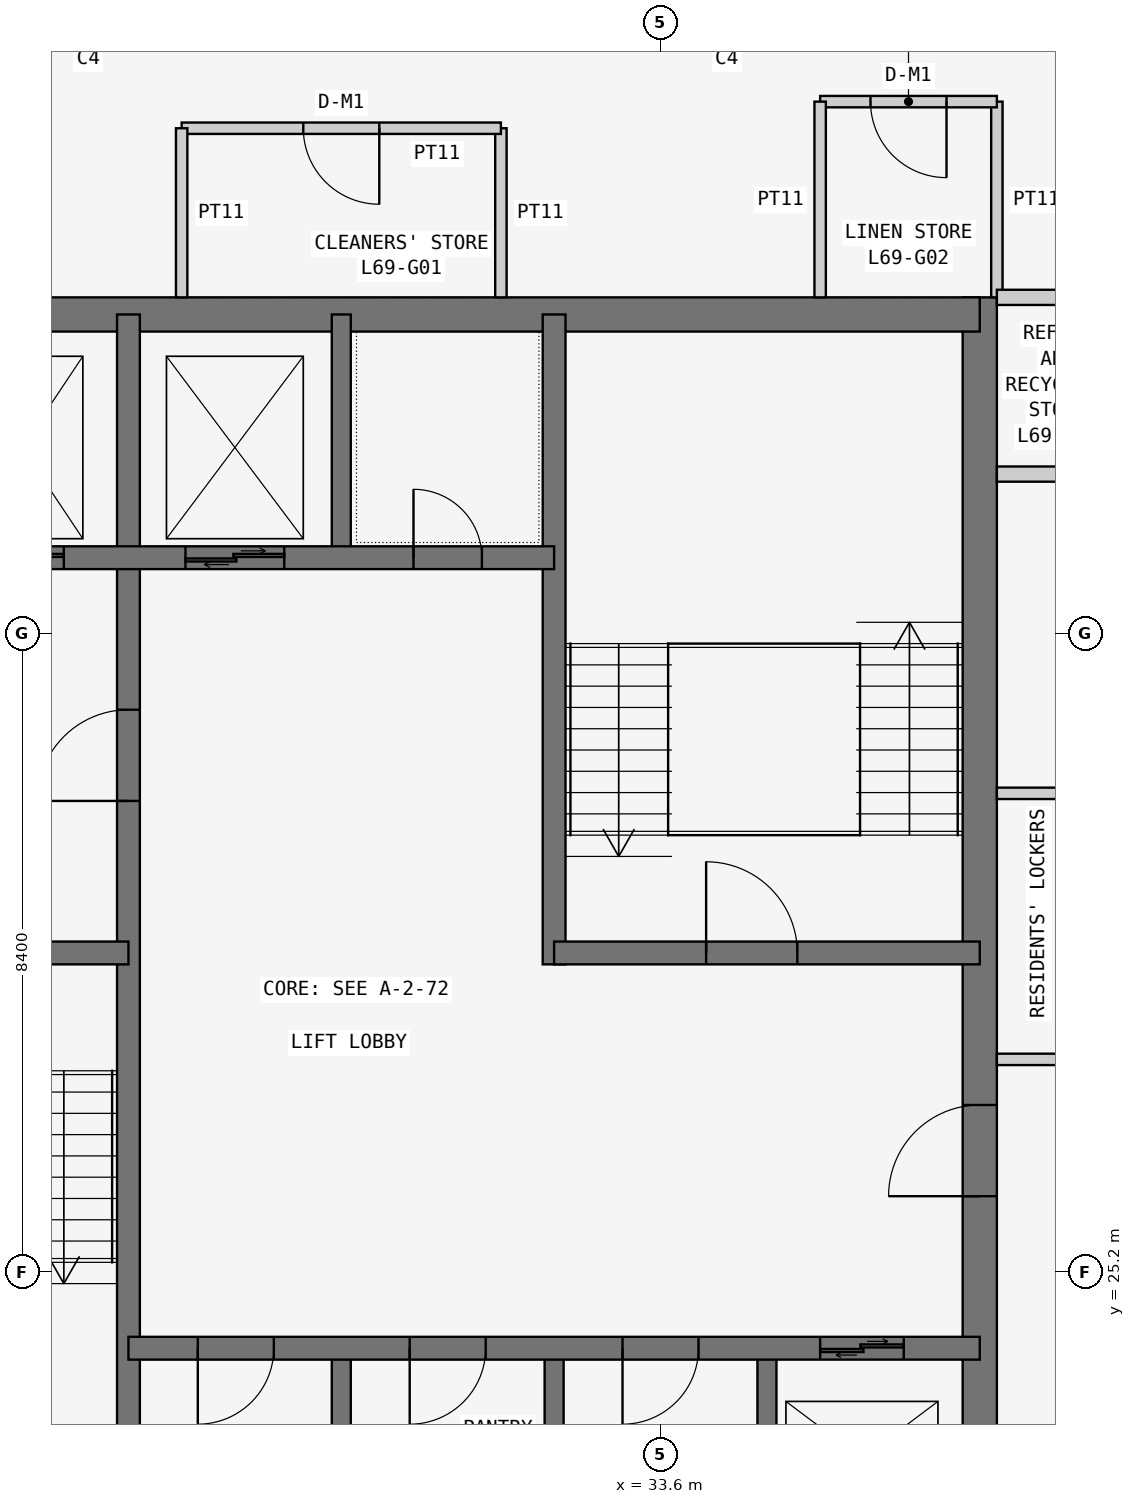
"""IFC4 building model, lengths in metres.
Left out: names, types, materials, properties, quantities, classifications, styles, units other than length and angle.
Written with IfcOpenShell. Run it as: python <this file> out.ifc"""

import sys

from ifc_helpers import new_model, si_unit, direction, frame, frame_2d, origin, place, context, subcontext, project, spatial, rectangle, extrude, element, fill, save


model = new_model("IFC4")
c1 = context("Model", 3, precision=1e-05, world=origin(), true_north=direction((0.0, 1.0)))
c2 = subcontext(c1, "Body", "Model", "MODEL_VIEW")
j1 = project(units=[si_unit("LENGTHUNIT", "METRE"), si_unit("PLANEANGLEUNIT", "RADIAN")], contexts=[c1])
p1 = place(None, origin())
s1 = spatial("IfcSite", under=j1, at=p1, CompositionType="ELEMENT")
p2 = place(p1, origin())
s2 = spatial("IfcBuilding", under=s1, at=p2, CompositionType="ELEMENT")
p3 = place(p2, frame((0.0, 0.0, 264.9)))
s3 = spatial("IfcBuildingStorey", under=s2, at=p3, CompositionType="ELEMENT", Elevation=264.9)
p4 = place(p3, frame((37.8, 21.0, 0.0), z_axis=(0.0, 0.0, 1.0), x_axis=(0.0, 1.0, 0.0)))
e1 = element("IfcWall", 1, at=p4, inside=s3, PredefinedType="SHEAR", context=c2, shape_type="SweptSolid", body=[
    extrude(rectangle(XDim=17.025, YDim=0.45, at=frame_2d((8.512, 0.0))), origin(), (0.0, 0.0, 1.0), 3.6),
])
p5 = place(p4, frame((5.2, 0.0, 0.0)))
e2 = element("IfcOpeningElement", 2, at=p5, cuts=e1, PredefinedType="OPENING", context=c2, shape_type="SweptSolid", body=[
    extrude(rectangle(XDim=1.2, YDim=2.1, at=frame_2d((0.6, 1.05))), frame((0.0, 0.235, 0.0), z_axis=(0.0, -1.0, 0.0), x_axis=(1.0, 0.0, 0.0)), (0.0, 0.0, 1.0), 0.47),
])
p6 = place(p3, frame((37.8, 37.8, 0.0), z_axis=(0.0, 0.0, 1.0), x_axis=(-1.0, 0.0, 0.0)))
e3 = element("IfcWall", 3, at=p6, inside=s3, PredefinedType="SHEAR", context=c2, shape_type="SweptSolid", body=[
    extrude(rectangle(XDim=17.025, YDim=0.45, at=frame_2d((8.513, 0.0))), origin(), (0.0, 0.0, 1.0), 3.6),
])
p7 = place(p3, frame((26.6, 21.0, 0.0), z_axis=(0.0, 0.0, 1.0), x_axis=(0.0, 1.0, 0.0)))
e4 = element("IfcWall", 4, at=p7, inside=s3, PredefinedType="SHEAR", context=c2, shape_type="SweptSolid", body=[
    extrude(rectangle(XDim=16.8, YDim=0.3, at=frame_2d((8.4, 0.0))), origin(), (0.0, 0.0, 1.0), 3.6),
])
p8 = place(p7, frame((10.4, 0.0, 0.0)))
e5 = element("IfcOpeningElement", 5, at=p8, cuts=e4, PredefinedType="OPENING", context=c2, shape_type="SweptSolid", body=[
    extrude(rectangle(XDim=1.2, YDim=2.1, at=frame_2d((0.6, 1.05))), frame((0.0, 0.16, 0.0), z_axis=(0.0, -1.0, 0.0), x_axis=(1.0, 0.0, 0.0)), (0.0, 0.0, 1.0), 0.32),
])
p9 = place(p3, frame((21.0, 29.4, 0.0), z_axis=(0.0, 0.0, 1.0), x_axis=(1.0, 0.0, 0.0)))
e6 = element("IfcWall", 6, at=p9, inside=s3, PredefinedType="SHEAR", context=c2, shape_type="SweptSolid", body=[
    extrude(rectangle(XDim=5.6, YDim=0.3, at=frame_2d((2.8, 0.0))), origin(), (0.0, 0.0, 1.0), 3.6),
])
p10 = place(p9, frame((2.3, 0.0, 0.0)))
e7 = element("IfcOpeningElement", 7, at=p10, cuts=e6, PredefinedType="OPENING", context=c2, shape_type="SweptSolid", body=[
    extrude(rectangle(XDim=1.2, YDim=2.1, at=frame_2d((0.6, 1.05))), frame((0.0, 0.16, 0.0), z_axis=(0.0, -1.0, 0.0), x_axis=(1.0, 0.0, 0.0)), (0.0, 0.0, 1.0), 0.32),
])
p11 = place(p3, frame((21.0, 34.6, 0.0), z_axis=(0.0, 0.0, 1.0), x_axis=(1.0, 0.0, 0.0)))
e8 = element("IfcWall", 8, at=p11, inside=s3, PredefinedType="SHEAR", context=c2, shape_type="SweptSolid", body=[
    extrude(rectangle(XDim=11.2, YDim=0.3, at=frame_2d((5.6, 0.0))), origin(), (0.0, 0.0, 1.0), 3.6),
])
p12 = place(p11, frame((9.35, 0.0, 0.0)))
e9 = element("IfcOpeningElement", 9, at=p12, cuts=e8, PredefinedType="OPENING", context=c2, shape_type="SweptSolid", body=[
    extrude(rectangle(XDim=0.9, YDim=2.1, at=frame_2d((0.45, 1.05))), frame((0.0, 0.16, 0.0), z_axis=(0.0, -1.0, 0.0), x_axis=(1.0, 0.0, 0.0)), (0.0, 0.0, 1.0), 0.32),
])
p13 = place(p11, frame((1.0, 0.0, 0.0)))
e10 = element("IfcOpeningElement", 10, at=p13, cuts=e8, PredefinedType="OPENING", context=c2, shape_type="SweptSolid", body=[
    extrude(rectangle(XDim=1.1, YDim=2.1, at=frame_2d((0.55, 1.05))), frame((0.0, 0.16, 0.0), z_axis=(0.0, -1.0, 0.0), x_axis=(1.0, 0.0, 0.0)), (0.0, 0.0, 1.0), 0.32),
])
p14 = place(p11, frame((3.65, 0.0, 0.0)))
e11 = element("IfcOpeningElement", 11, at=p14, cuts=e8, PredefinedType="OPENING", context=c2, shape_type="SweptSolid", body=[
    extrude(rectangle(XDim=1.1, YDim=2.1, at=frame_2d((0.55, 1.05))), frame((0.0, 0.16, 0.0), z_axis=(0.0, -1.0, 0.0), x_axis=(1.0, 0.0, 0.0)), (0.0, 0.0, 1.0), 0.32),
])
p15 = place(p11, frame((6.35, 0.0, 0.0)))
e12 = element("IfcOpeningElement", 12, at=p15, cuts=e8, PredefinedType="OPENING", context=c2, shape_type="SweptSolid", body=[
    extrude(rectangle(XDim=1.3, YDim=2.1, at=frame_2d((0.65, 1.05))), frame((0.0, 0.16, 0.0), z_axis=(0.0, -1.0, 0.0), x_axis=(1.0, 0.0, 0.0)), (0.0, 0.0, 1.0), 0.32),
])
p16 = place(p3, frame((26.6, 24.2, 0.0), z_axis=(0.0, 0.0, 1.0), x_axis=(1.0, 0.0, 0.0)))
e13 = element("IfcWall", 13, at=p16, inside=s3, PredefinedType="SHEAR", context=c2, shape_type="SweptSolid", body=[
    extrude(rectangle(XDim=11.2, YDim=0.3, at=frame_2d((5.6, 0.0))), origin(), (0.0, 0.0, 1.0), 3.6),
])
p17 = place(p16, frame((0.913, 0.0, 0.0)))
e14 = element("IfcOpeningElement", 14, at=p17, cuts=e13, PredefinedType="OPENING", context=c2, shape_type="SweptSolid", body=[
    extrude(rectangle(XDim=1.0, YDim=2.1, at=frame_2d((0.5, 1.05))), frame((0.0, 0.16, 0.0), z_axis=(0.0, -1.0, 0.0), x_axis=(1.0, 0.0, 0.0)), (0.0, 0.0, 1.0), 0.32),
])
p18 = place(p16, frame((3.7, 0.0, 0.0)))
e15 = element("IfcOpeningElement", 15, at=p18, cuts=e13, PredefinedType="OPENING", context=c2, shape_type="SweptSolid", body=[
    extrude(rectangle(XDim=1.0, YDim=2.1, at=frame_2d((0.5, 1.05))), frame((0.0, 0.16, 0.0), z_axis=(0.0, -1.0, 0.0), x_axis=(1.0, 0.0, 0.0)), (0.0, 0.0, 1.0), 0.32),
])
p19 = place(p16, frame((6.5, 0.0, 0.0)))
e16 = element("IfcOpeningElement", 16, at=p19, cuts=e13, PredefinedType="OPENING", context=c2, shape_type="SweptSolid", body=[
    extrude(rectangle(XDim=1.0, YDim=2.1, at=frame_2d((0.5, 1.05))), frame((0.0, 0.16, 0.0), z_axis=(0.0, -1.0, 0.0), x_axis=(1.0, 0.0, 0.0)), (0.0, 0.0, 1.0), 0.32),
])
p20 = place(p16, frame((9.1, 0.0, 0.0)))
e17 = element("IfcOpeningElement", 17, at=p20, cuts=e13, PredefinedType="OPENING", context=c2, shape_type="SweptSolid", body=[
    extrude(rectangle(XDim=1.1, YDim=2.1, at=frame_2d((0.55, 1.05))), frame((0.0, 0.16, 0.0), z_axis=(0.0, -1.0, 0.0), x_axis=(1.0, 0.0, 0.0)), (0.0, 0.0, 1.0), 0.32),
])
p21 = place(p3, frame((32.2, 29.25, 0.0), z_axis=(0.0, 0.0, 1.0), x_axis=(0.0, 1.0, 0.0)))
e18 = element("IfcWall", 18, at=p21, inside=s3, PredefinedType="SHEAR", context=c2, shape_type="SweptSolid", body=[
    extrude(rectangle(XDim=8.55, YDim=0.3, at=frame_2d((4.275, 0.0))), origin(), (0.0, 0.0, 1.0), 3.6),
])
p22 = place(p3, frame((32.2, 29.4, 0.0), z_axis=(0.0, 0.0, 1.0), x_axis=(1.0, 0.0, 0.0)))
e19 = element("IfcWall", 19, at=p22, inside=s3, PredefinedType="SHEAR", context=c2, shape_type="SweptSolid", body=[
    extrude(rectangle(XDim=5.6, YDim=0.3, at=frame_2d((2.8, 0.0))), origin(), (0.0, 0.0, 1.0), 3.6),
])
p23 = place(p22, frame((2.0, 0.0, 0.0)))
e20 = element("IfcOpeningElement", 20, at=p23, cuts=e19, PredefinedType="OPENING", context=c2, shape_type="SweptSolid", body=[
    extrude(rectangle(XDim=1.2, YDim=2.1, at=frame_2d((0.6, 1.05))), frame((0.0, 0.16, 0.0), z_axis=(0.0, -1.0, 0.0), x_axis=(1.0, 0.0, 0.0)), (0.0, 0.0, 1.0), 0.32),
])
for number, where, z_axis, x_axis in (
    (21, (29.4, 21.0, 0.0), (0.0, 0.0, 1.0), (0.0, 1.0, 0.0)),
    (22, (32.2, 21.0, 0.0), (0.0, 0.0, 1.0), (0.0, 1.0, 0.0)),
    (23, (35.0, 21.0, 0.0), (0.0, 0.0, 1.0), (0.0, 1.0, 0.0)),
    (24, (29.4, 34.6, 0.0), (0.0, 0.0, 1.0), (0.0, 1.0, 0.0)),
):
    element("IfcWall", number, at=place(p3, frame(where, z_axis=z_axis, x_axis=x_axis)), inside=s3, PredefinedType="SHEAR", context=c2, shape_type="SweptSolid", body=[
        extrude(rectangle(XDim=3.2, YDim=0.25, at=frame_2d((1.6, 0.0))), origin(), (0.0, 0.0, 1.0), 3.6),
    ])
p24 = place(p3, frame((31.5, 38.025, 0.0), z_axis=(0.0, 0.0, 1.0), x_axis=(0.0, 1.0, 0.0)))
e25 = element("IfcWall", 25, at=p24, inside=s3, PredefinedType="PARTITIONING", context=c2, shape_type="SweptSolid", body=[
    extrude(rectangle(XDim=2.225, YDim=0.15, at=frame_2d((1.113, 0.0))), origin(), (0.0, 0.0, 1.0), 3.45),
])
p25 = place(p3, frame((31.5, 40.25, 0.0), z_axis=(0.0, 0.0, 1.0), x_axis=(-1.0, 0.0, 0.0)))
e26 = element("IfcWall", 26, at=p25, inside=s3, PredefinedType="PARTITIONING", context=c2, shape_type="SweptSolid", body=[
    extrude(rectangle(XDim=4.2, YDim=0.15, at=frame_2d((2.1, 0.0))), origin(), (0.0, 0.0, 1.0), 3.45),
])
p26 = place(p25, frame((1.6, 0.0, 0.0)))
e27 = element("IfcOpeningElement", 27, at=p26, cuts=e26, PredefinedType="OPENING", context=c2, shape_type="SweptSolid", body=[
    extrude(rectangle(XDim=1.0, YDim=2.1, at=frame_2d((0.5, 1.05))), frame((0.0, 0.085, 0.0), z_axis=(0.0, -1.0, 0.0), x_axis=(1.0, 0.0, 0.0)), (0.0, 0.0, 1.0), 0.17),
])
p27 = place(p3, frame((27.3, 40.25, 0.0), z_axis=(0.0, 0.0, 1.0), x_axis=(0.0, -1.0, 0.0)))
e28 = element("IfcWall", 28, at=p27, inside=s3, PredefinedType="PARTITIONING", context=c2, shape_type="SweptSolid", body=[
    extrude(rectangle(XDim=2.225, YDim=0.15, at=frame_2d((1.113, 0.0))), origin(), (0.0, 0.0, 1.0), 3.45),
])
p28 = place(p3, frame((38.025, 38.025, 0.0), z_axis=(0.0, 0.0, 1.0), x_axis=(0.0, 1.0, 0.0)))
e29 = element("IfcWall", 29, at=p28, inside=s3, PredefinedType="PARTITIONING", context=c2, shape_type="SweptSolid", body=[
    extrude(rectangle(XDim=2.575, YDim=0.15, at=frame_2d((1.288, 0.0))), origin(), (0.0, 0.0, 1.0), 3.45),
])
p29 = place(p3, frame((38.025, 40.6, 0.0), z_axis=(0.0, 0.0, 1.0), x_axis=(-1.0, 0.0, 0.0)))
e30 = element("IfcWall", 30, at=p29, inside=s3, PredefinedType="PARTITIONING", context=c2, shape_type="SweptSolid", body=[
    extrude(rectangle(XDim=2.325, YDim=0.15, at=frame_2d((1.163, 0.0))), origin(), (0.0, 0.0, 1.0), 3.45),
])
p30 = place(p29, frame((0.663, 0.0, 0.0)))
e31 = element("IfcOpeningElement", 31, at=p30, cuts=e30, PredefinedType="OPENING", context=c2, shape_type="SweptSolid", body=[
    extrude(rectangle(XDim=1.0, YDim=2.1, at=frame_2d((0.5, 1.05))), frame((0.0, 0.085, 0.0), z_axis=(0.0, -1.0, 0.0), x_axis=(1.0, 0.0, 0.0)), (0.0, 0.0, 1.0), 0.17),
])
for number, where, z_axis, x_axis in (
    (32, (35.7, 40.6, 0.0), (0.0, 0.0, 1.0), (0.0, -1.0, 0.0)),
    (33, (38.025, 28.0, 0.0), (0.0, 0.0, 1.0), (1.0, 0.0, 0.0)),
    (34, (40.6, 31.5, 0.0), (0.0, 0.0, 1.0), (-1.0, 0.0, 0.0)),
):
    element("IfcWall", number, at=place(p3, frame(where, z_axis=z_axis, x_axis=x_axis)), inside=s3, PredefinedType="PARTITIONING", context=c2, shape_type="SweptSolid", body=[
        extrude(rectangle(XDim=2.575, YDim=0.15, at=frame_2d((1.288, 0.0))), origin(), (0.0, 0.0, 1.0), 3.45),
    ])
for number, where, z_axis, x_axis in (
    (35, (38.025, 35.7, 0.0), (0.0, 0.0, 1.0), (1.0, 0.0, 0.0)),
    (36, (40.6, 38.025, 0.0), (0.0, 0.0, 1.0), (-1.0, 0.0, 0.0)),
):
    element("IfcWall", number, at=place(p3, frame(where, z_axis=z_axis, x_axis=x_axis)), inside=s3, PredefinedType="PARTITIONING", context=c2, shape_type="SweptSolid", body=[
        extrude(rectangle(XDim=2.575, YDim=0.2, at=frame_2d((1.288, 0.0))), origin(), (0.0, 0.0, 1.0), 3.45),
    ])
p31 = place(p26, origin())
e37 = element("IfcDoor", 37, at=p31, inside=s3, OperationType="SINGLE_SWING_LEFT", PredefinedType="DOOR", context=c2, shape_type="SweptSolid", body=[
    extrude(rectangle(XDim=1.0, YDim=2.1, at=frame_2d((0.5, 1.05))), frame((0.0, 0.025, 0.0), z_axis=(0.0, -1.0, 0.0), x_axis=(1.0, 0.0, 0.0)), (0.0, 0.0, 1.0), 0.05),
])
fill(e27, e37)
p32 = place(p30, origin())
e38 = element("IfcDoor", 38, at=p32, inside=s3, OperationType="SINGLE_SWING_LEFT", PredefinedType="DOOR", context=c2, shape_type="SweptSolid", body=[
    extrude(rectangle(XDim=1.0, YDim=2.1, at=frame_2d((0.5, 1.05))), frame((0.0, 0.025, 0.0), z_axis=(0.0, -1.0, 0.0), x_axis=(1.0, 0.0, 0.0)), (0.0, 0.0, 1.0), 0.05),
])
fill(e31, e38)
p33 = place(p8, origin())
e39 = element("IfcDoor", 39, at=p33, inside=s3, OperationType="SINGLE_SWING_LEFT", PredefinedType="DOOR", context=c2, shape_type="SweptSolid", body=[
    extrude(rectangle(XDim=1.2, YDim=2.1, at=frame_2d((0.6, 1.05))), frame((0.0, 0.025, 0.0), z_axis=(0.0, -1.0, 0.0), x_axis=(1.0, 0.0, 0.0)), (0.0, 0.0, 1.0), 0.05),
])
fill(e5, e39)
p34 = place(p5, origin())
e40 = element("IfcDoor", 40, at=p34, inside=s3, OperationType="SINGLE_SWING_LEFT", PredefinedType="DOOR", context=c2, shape_type="SweptSolid", body=[
    extrude(rectangle(XDim=1.2, YDim=2.1, at=frame_2d((0.6, 1.05))), frame((0.0, 0.025, 0.0), z_axis=(0.0, -1.0, 0.0), x_axis=(1.0, 0.0, 0.0)), (0.0, 0.0, 1.0), 0.05),
])
fill(e2, e40)
p35 = place(p23, origin())
e41 = element("IfcDoor", 41, at=p35, inside=s3, OperationType="SINGLE_SWING_LEFT", PredefinedType="DOOR", context=c2, shape_type="SweptSolid", body=[
    extrude(rectangle(XDim=1.2, YDim=2.1, at=frame_2d((0.6, 1.05))), frame((0.0, 0.025, 0.0), z_axis=(0.0, -1.0, 0.0), x_axis=(1.0, 0.0, 0.0)), (0.0, 0.0, 1.0), 0.05),
])
fill(e20, e41)
p36 = place(p12, origin())
e42 = element("IfcDoor", 42, at=p36, inside=s3, OperationType="SINGLE_SWING_LEFT", PredefinedType="DOOR", context=c2, shape_type="SweptSolid", body=[
    extrude(rectangle(XDim=0.9, YDim=2.1, at=frame_2d((0.45, 1.05))), frame((0.0, 0.025, 0.0), z_axis=(0.0, -1.0, 0.0), x_axis=(1.0, 0.0, 0.0)), (0.0, 0.0, 1.0), 0.05),
])
fill(e9, e42)
p37 = place(p17, frame((1.0, 0.0, 0.0), z_axis=(0.0, 0.0, 1.0), x_axis=(-1.0, 0.0, 0.0)))
e43 = element("IfcDoor", 43, at=p37, inside=s3, OperationType="SINGLE_SWING_RIGHT", PredefinedType="DOOR", context=c2, shape_type="SweptSolid", body=[
    extrude(rectangle(XDim=1.0, YDim=2.1, at=frame_2d((0.5, 1.05))), frame((0.0, 0.025, 0.0), z_axis=(0.0, -1.0, 0.0), x_axis=(1.0, 0.0, 0.0)), (0.0, 0.0, 1.0), 0.05),
])
fill(e14, e43)
p38 = place(p18, frame((1.0, 0.0, 0.0), z_axis=(0.0, 0.0, 1.0), x_axis=(-1.0, 0.0, 0.0)))
e44 = element("IfcDoor", 44, at=p38, inside=s3, OperationType="SINGLE_SWING_RIGHT", PredefinedType="DOOR", context=c2, shape_type="SweptSolid", body=[
    extrude(rectangle(XDim=1.0, YDim=2.1, at=frame_2d((0.5, 1.05))), frame((0.0, 0.025, 0.0), z_axis=(0.0, -1.0, 0.0), x_axis=(1.0, 0.0, 0.0)), (0.0, 0.0, 1.0), 0.05),
])
fill(e15, e44)
p39 = place(p19, frame((1.0, 0.0, 0.0), z_axis=(0.0, 0.0, 1.0), x_axis=(-1.0, 0.0, 0.0)))
e45 = element("IfcDoor", 45, at=p39, inside=s3, OperationType="SINGLE_SWING_RIGHT", PredefinedType="DOOR", context=c2, shape_type="SweptSolid", body=[
    extrude(rectangle(XDim=1.0, YDim=2.1, at=frame_2d((0.5, 1.05))), frame((0.0, 0.025, 0.0), z_axis=(0.0, -1.0, 0.0), x_axis=(1.0, 0.0, 0.0)), (0.0, 0.0, 1.0), 0.05),
])
fill(e16, e45)
p40 = place(p20, origin())
e46 = element("IfcDoor", 46, at=p40, inside=s3, OperationType="DOUBLE_DOOR_SLIDING", PredefinedType="DOOR", context=c2, shape_type="SweptSolid", body=[
    extrude(rectangle(XDim=1.1, YDim=2.1, at=frame_2d((0.55, 1.05))), frame((0.0, 0.025, 0.0), z_axis=(0.0, -1.0, 0.0), x_axis=(1.0, 0.0, 0.0)), (0.0, 0.0, 1.0), 0.05),
])
fill(e17, e46)
p41 = place(p14, origin())
e47 = element("IfcDoor", 47, at=p41, inside=s3, OperationType="DOUBLE_DOOR_SLIDING", PredefinedType="DOOR", context=c2, shape_type="SweptSolid", body=[
    extrude(rectangle(XDim=1.1, YDim=2.1, at=frame_2d((0.55, 1.05))), frame((0.0, 0.025, 0.0), z_axis=(0.0, -1.0, 0.0), x_axis=(1.0, 0.0, 0.0)), (0.0, 0.0, 1.0), 0.05),
])
fill(e11, e47)
p42 = place(p15, origin())
e48 = element("IfcDoor", 48, at=p42, inside=s3, OperationType="DOUBLE_DOOR_SLIDING", PredefinedType="DOOR", context=c2, shape_type="SweptSolid", body=[
    extrude(rectangle(XDim=1.3, YDim=2.1, at=frame_2d((0.65, 1.05))), frame((0.0, 0.025, 0.0), z_axis=(0.0, -1.0, 0.0), x_axis=(1.0, 0.0, 0.0)), (0.0, 0.0, 1.0), 0.05),
])
fill(e12, e48)
save(model, sys.argv[1])
